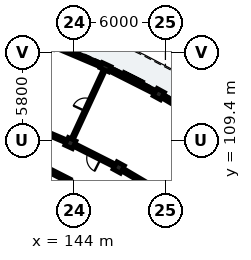
"""IFC4 building model, lengths in metres.
Left out: names, types, materials, properties, quantities, classifications, styles, units other than length and angle.
Written with IfcOpenShell. Run it as: python <this file> out.ifc"""

import sys

from ifc_helpers import new_model, si_unit, direction, frame, frame_2d, origin, origin_2d, place, context, subcontext, project, spatial, rectangle, extrude, element, fill, save


model = new_model("IFC4")
c1 = context("Model", 3, precision=1e-05, world=origin(), true_north=direction((0.0, 1.0)))
c2 = subcontext(c1, "Body", "Model", "MODEL_VIEW")
j1 = project(units=[si_unit("LENGTHUNIT", "METRE"), si_unit("PLANEANGLEUNIT", "RADIAN")], contexts=[c1])
p1 = place(None, origin())
s1 = spatial("IfcSite", under=j1, at=p1, CompositionType="ELEMENT")
p2 = place(p1, origin())
s2 = spatial("IfcBuilding", under=s1, at=p2, CompositionType="ELEMENT")
p3 = place(p2, frame((0.0, 0.0, 22.28)))
s3 = spatial("IfcBuildingStorey", under=s2, at=p3, CompositionType="ELEMENT", Elevation=22.28)
p4 = place(p3, frame((140.629, 108.307, 0.0), z_axis=(0.0, 0.0, 1.0), x_axis=(0.891032414707, -0.453939683153, 0.0)))
e1 = element("IfcWall", 1, at=p4, inside=s3, PredefinedType="SHEAR", context=c2, shape_type="SweptSolid", body=[
    extrude(rectangle(XDim=3.42, YDim=0.25, at=frame_2d((1.71, 0.0))), origin(), (0.0, 0.0, 1.0), 3.11),
])
for number, where, z_axis, x_axis in (
    (2, (146.928, 107.625, 0.0), (0.0, 0.0, 1.0), (0.48, 0.877, 0.0)),
    (3, (149.567, 112.451, 0.0), (0.0, 0.0, 1.0), (0.48, 0.877, 0.0)),
    (4, (143.748, 109.23, 0.0), (0.0, 0.0, 1.0), (0.421, 0.907, 0.0)),
):
    element("IfcColumn", number, at=place(p3, frame(where, z_axis=z_axis, x_axis=x_axis)), inside=s3, PredefinedType="COLUMN", context=c2, shape_type="SweptSolid", body=[
        extrude(rectangle(XDim=0.55, YDim=0.55, at=origin_2d()), origin(), (0.0, 0.0, 1.0), 3.11),
    ])
p5 = place(p3, frame((146.062, 114.219, 0.0), z_axis=(0.0, 0.0, 1.0), x_axis=(0.420859860775, 0.907125668024, 0.0)))
e5 = element("IfcColumn", 5, at=p5, inside=s3, PredefinedType="PILASTER", context=c2, shape_type="SweptSolid", body=[
    extrude(rectangle(XDim=0.38, YDim=0.62, at=origin_2d()), origin(), (0.0, 0.0, 1.0), 3.11),
])
p6 = place(p3, frame((152.81, 110.536, 0.0), z_axis=(0.0, 0.0, 1.0), x_axis=(-0.861136297738, 0.508374150324, 0.0)))
e6 = element("IfcWall", 6, at=p6, inside=s3, PredefinedType="SOLIDWALL", context=c2, shape_type="SweptSolid", body=[
    extrude(rectangle(XDim=3.521, YDim=0.24, at=frame_2d((1.76, 0.0))), origin(), (0.0, 0.0, 1.0), 2.355),
])
p7 = place(p6, frame((0.985, 0.0, 0.35)))
e7 = element("IfcOpeningElement", 7, at=p7, cuts=e6, PredefinedType="OPENING", context=c2, shape_type="SweptSolid", body=[
    extrude(rectangle(XDim=1.55, YDim=1.75, at=frame_2d((0.775, 0.875))), frame((0.0, 0.13, 0.0), z_axis=(0.0, -1.0, 0.0), x_axis=(1.0, 0.0, 0.0)), (0.0, 0.0, 1.0), 0.26),
])
p8 = place(p3, frame((149.348, 112.561, 0.0), z_axis=(0.0, 0.0, 1.0), x_axis=(-0.892756700232, 0.450539092855, 0.0)))
e8 = element("IfcWall", 8, at=p8, inside=s3, PredefinedType="SOLIDWALL", context=c2, shape_type="SweptSolid", body=[
    extrude(rectangle(XDim=3.521, YDim=0.24, at=frame_2d((1.76, 0.0))), origin(), (0.0, 0.0, 1.0), 2.355),
])
p9 = place(p8, frame((0.91, 0.0, 0.35)))
e9 = element("IfcOpeningElement", 9, at=p9, cuts=e8, PredefinedType="OPENING", context=c2, shape_type="SweptSolid", body=[
    extrude(rectangle(XDim=1.7, YDim=1.8, at=frame_2d((0.85, 0.9))), frame((0.0, 0.13, 0.0), z_axis=(0.0, -1.0, 0.0), x_axis=(1.0, 0.0, 0.0)), (0.0, 0.0, 1.0), 0.26),
])
p10 = place(p3, frame((145.915, 114.282, 0.0), z_axis=(0.0, 0.0, 1.0), x_axis=(-0.920502438884, 0.390736816807, 0.0)))
e10 = element("IfcWall", 10, at=p10, inside=s3, PredefinedType="SOLIDWALL", context=c2, shape_type="SweptSolid", body=[
    extrude(rectangle(XDim=3.521, YDim=0.24, at=frame_2d((1.76, 0.0))), origin(), (0.0, 0.0, 1.0), 2.355),
])
p11 = place(p10, frame((1.22, 0.0, 0.55)))
e11 = element("IfcOpeningElement", 11, at=p11, cuts=e10, PredefinedType="OPENING", context=c2, shape_type="SweptSolid", body=[
    extrude(rectangle(XDim=1.08, YDim=1.45, at=frame_2d((0.54, 0.725))), frame((0.0, 0.13, 0.0), z_axis=(0.0, -1.0, 0.0), x_axis=(1.0, 0.0, 0.0)), (0.0, 0.0, 1.0), 0.26),
])
p12 = place(p3, frame((150.211, 106.151, 0.0), z_axis=(0.0, 0.0, 1.0), x_axis=(0.536492262982, 0.843905238614, 0.0)))
e12 = element("IfcWall", 12, at=p12, inside=s3, PredefinedType="PARTITIONING", context=c2, shape_type="SweptSolid", body=[
    extrude(rectangle(XDim=4.7, YDim=0.125, at=frame_2d((2.35, 0.0))), origin(), (0.0, 0.0, 1.0), 2.37),
])
p13 = place(p12, frame((1.905, 0.0, 0.0)))
e13 = element("IfcOpeningElement", 13, at=p13, cuts=e12, PredefinedType="OPENING", context=c2, shape_type="SweptSolid", body=[
    extrude(rectangle(XDim=0.89, YDim=2.1, at=frame_2d((0.445, 1.05))), frame((0.0, 0.073, 0.0), z_axis=(0.0, -1.0, 0.0), x_axis=(1.0, 0.0, 0.0)), (0.0, 0.0, 1.0), 0.145),
])
p14 = place(p3, frame((149.695, 105.991, 0.0), z_axis=(0.0, 0.0, 1.0), x_axis=(-0.861113214678, 0.508413248753, 0.0)))
e14 = element("IfcWall", 14, at=p14, inside=s3, PredefinedType="PARTITIONING", context=c2, shape_type="SweptSolid", body=[
    extrude(rectangle(XDim=2.863, YDim=0.205, at=frame_2d((1.432, 0.0))), origin(), (0.0, 0.0, 1.0), 2.37),
])
p15 = place(p14, frame((0.957, 0.0, 0.0)))
e15 = element("IfcOpeningElement", 15, at=p15, cuts=e14, PredefinedType="OPENING", context=c2, shape_type="SweptSolid", body=[
    extrude(rectangle(XDim=0.95, YDim=2.13, at=frame_2d((0.475, 1.065))), frame((0.0, 0.113, 0.0), z_axis=(0.0, -1.0, 0.0), x_axis=(1.0, 0.0, 0.0)), (0.0, 0.0, 1.0), 0.225),
])
p16 = place(p3, frame((146.616, 107.782, 0.0), z_axis=(0.0, 0.0, 1.0), x_axis=(-0.89273239336, 0.450587254419, 0.0)))
e16 = element("IfcWall", 16, at=p16, inside=s3, PredefinedType="PARTITIONING", context=c2, shape_type="SweptSolid", body=[
    extrude(rectangle(XDim=2.863, YDim=0.205, at=frame_2d((1.432, 0.0))), origin(), (0.0, 0.0, 1.0), 2.37),
])
p17 = place(p16, frame((0.967, 0.0, 0.0)))
e17 = element("IfcOpeningElement", 17, at=p17, cuts=e16, PredefinedType="OPENING", context=c2, shape_type="SweptSolid", body=[
    extrude(rectangle(XDim=0.93, YDim=2.12, at=frame_2d((0.465, 1.06))), frame((0.0, 0.113, 0.0), z_axis=(0.0, -1.0, 0.0), x_axis=(1.0, 0.0, 0.0)), (0.0, 0.0, 1.0), 0.225),
])
p18 = place(p3, frame((143.916, 109.593, 0.0), z_axis=(0.0, 0.0, 1.0), x_axis=(0.420862519045, 0.907124434718, 0.0)))
e18 = element("IfcWall", 18, at=p18, inside=s3, PredefinedType="PLUMBINGWALL", context=c2, shape_type="SweptSolid", body=[
    extrude(rectangle(XDim=4.7, YDim=0.15, at=frame_2d((2.35, 0.0))), origin(), (0.0, 0.0, 1.0), 2.37),
])
p19 = place(p18, frame((1.92, 0.0, 0.0)))
e19 = element("IfcOpeningElement", 19, at=p19, cuts=e18, PredefinedType="OPENING", context=c2, shape_type="SweptSolid", body=[
    extrude(rectangle(XDim=0.86, YDim=2.06, at=frame_2d((0.43, 1.03))), frame((0.0, 0.085, 0.0), z_axis=(0.0, -1.0, 0.0), x_axis=(1.0, 0.0, 0.0)), (0.0, 0.0, 1.0), 0.17),
])
p20 = place(p3, frame((143.425, 109.367, 0.0), z_axis=(0.0, 0.0, 1.0), x_axis=(-0.920511160294, 0.390716270168, 0.0)))
e20 = element("IfcWall", 20, at=p20, inside=s3, PredefinedType="PARTITIONING", context=c2, shape_type="SweptSolid", body=[
    extrude(rectangle(XDim=2.863, YDim=0.205, at=frame_2d((1.432, 0.0))), origin(), (0.0, 0.0, 1.0), 2.37),
])
p21 = place(p20, frame((0.937, 0.0, 0.0)))
e21 = element("IfcOpeningElement", 21, at=p21, cuts=e20, PredefinedType="OPENING", context=c2, shape_type="SweptSolid", body=[
    extrude(rectangle(XDim=0.99, YDim=2.16, at=frame_2d((0.495, 1.08))), frame((0.0, 0.113, 0.0), z_axis=(0.0, -1.0, 0.0), x_axis=(1.0, 0.0, 0.0)), (0.0, 0.0, 1.0), 0.225),
])
p22 = place(p9, origin())
e22 = element("IfcWindow", 22, at=p22, inside=s3, PartitioningType="SINGLE_PANEL", PredefinedType="WINDOW", context=c2, shape_type="SweptSolid", body=[
    extrude(rectangle(XDim=1.7, YDim=1.8, at=frame_2d((0.85, 0.9))), frame((0.0, 0.03, 0.0), z_axis=(0.0, -1.0, 0.0), x_axis=(1.0, 0.0, 0.0)), (0.0, 0.0, 1.0), 0.06),
])
fill(e9, e22)
p23 = place(p11, origin())
e23 = element("IfcWindow", 23, at=p23, inside=s3, PartitioningType="SINGLE_PANEL", PredefinedType="WINDOW", context=c2, shape_type="SweptSolid", body=[
    extrude(rectangle(XDim=1.08, YDim=1.45, at=frame_2d((0.54, 0.725))), frame((0.0, 0.03, 0.0), z_axis=(0.0, -1.0, 0.0), x_axis=(1.0, 0.0, 0.0)), (0.0, 0.0, 1.0), 0.06),
])
fill(e11, e23)
p24 = place(p15, origin())
e24 = element("IfcDoor", 24, at=p24, inside=s3, OperationType="SINGLE_SWING_RIGHT", PredefinedType="DOOR", context=c2, shape_type="SweptSolid", body=[
    extrude(rectangle(XDim=0.95, YDim=2.13, at=frame_2d((0.475, 1.065))), frame((0.0, 0.025, 0.0), z_axis=(0.0, -1.0, 0.0), x_axis=(1.0, 0.0, 0.0)), (0.0, 0.0, 1.0), 0.05),
])
fill(e15, e24)
p25 = place(p17, origin())
e25 = element("IfcDoor", 25, at=p25, inside=s3, OperationType="SINGLE_SWING_LEFT", PredefinedType="DOOR", context=c2, shape_type="SweptSolid", body=[
    extrude(rectangle(XDim=0.93, YDim=2.12, at=frame_2d((0.465, 1.06))), frame((0.0, 0.025, 0.0), z_axis=(0.0, -1.0, 0.0), x_axis=(1.0, 0.0, 0.0)), (0.0, 0.0, 1.0), 0.05),
])
fill(e17, e25)
p26 = place(p19, origin())
e26 = element("IfcDoor", 26, at=p26, inside=s3, OperationType="SINGLE_SWING_LEFT", PredefinedType="DOOR", context=c2, shape_type="SweptSolid", body=[
    extrude(rectangle(XDim=0.86, YDim=2.06, at=frame_2d((0.43, 1.03))), frame((0.0, 0.025, 0.0), z_axis=(0.0, -1.0, 0.0), x_axis=(1.0, 0.0, 0.0)), (0.0, 0.0, 1.0), 0.05),
])
fill(e19, e26)
p27 = place(p21, origin())
e27 = element("IfcDoor", 27, at=p27, inside=s3, OperationType="SINGLE_SWING_RIGHT", PredefinedType="DOOR", context=c2, shape_type="SweptSolid", body=[
    extrude(rectangle(XDim=0.99, YDim=2.16, at=frame_2d((0.495, 1.08))), frame((0.0, 0.025, 0.0), z_axis=(0.0, -1.0, 0.0), x_axis=(1.0, 0.0, 0.0)), (0.0, 0.0, 1.0), 0.05),
])
fill(e21, e27)
save(model, sys.argv[1])
